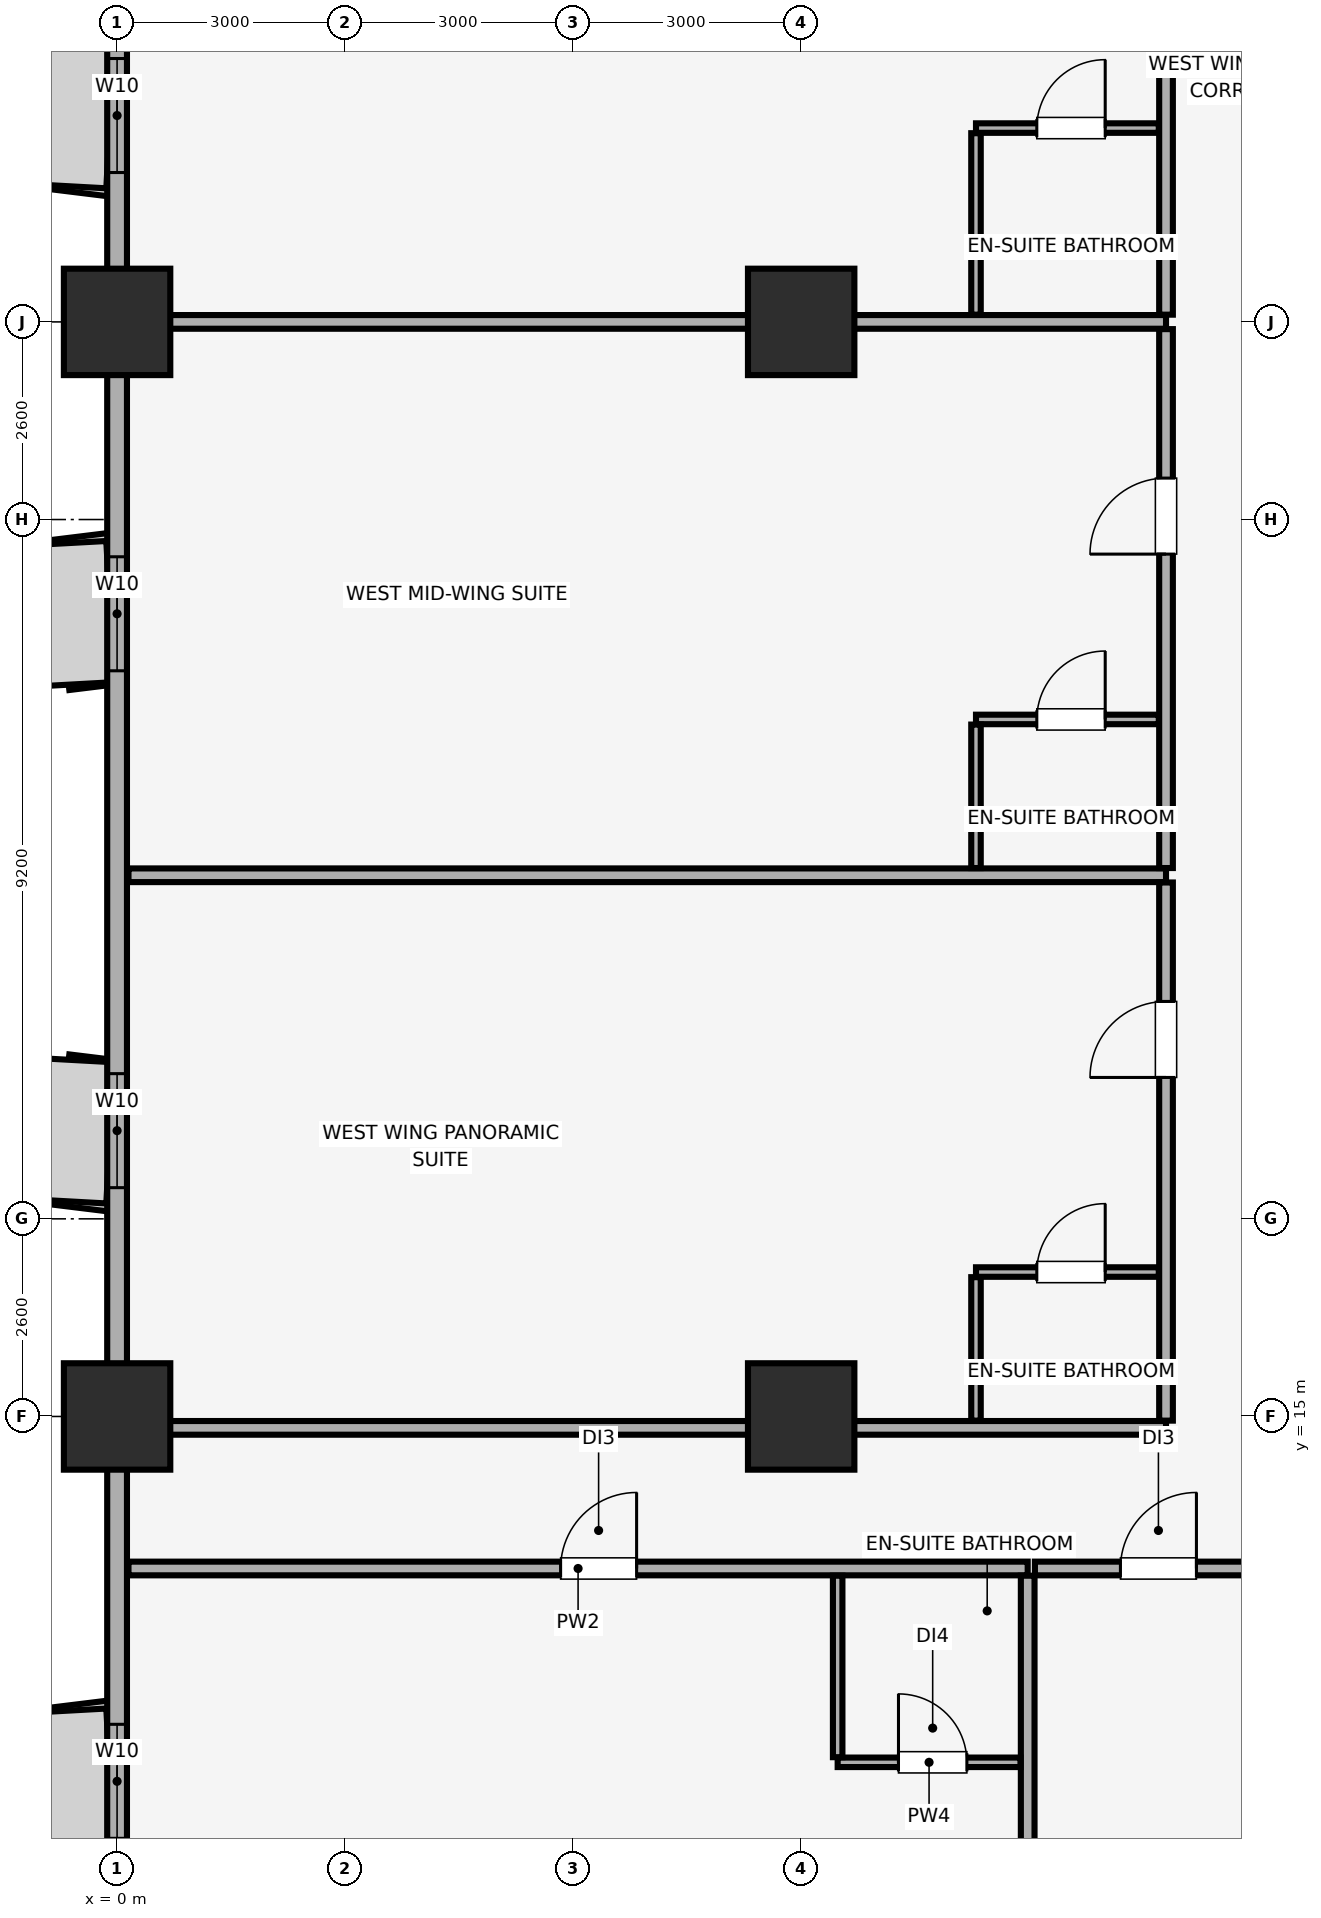
"""IFC4 building model, lengths in metres.
Left out: names, types, materials, properties, quantities, classifications, styles, units other than length and angle.
Written with IfcOpenShell. Run it as: python <this file> out.ifc"""

import sys

from ifc_helpers import new_model, si_unit, direction, frame, frame_2d, origin, origin_2d, place, context, subcontext, project, spatial, rectangle, extrude, element, fill, save


model = new_model("IFC4")
c1 = context("Model", 3, precision=1e-05, world=origin(), true_north=direction((0.0, 1.0)))
c2 = subcontext(c1, "Body", "Model", "MODEL_VIEW")
j1 = project(units=[si_unit("LENGTHUNIT", "METRE"), si_unit("PLANEANGLEUNIT", "RADIAN")], contexts=[c1])
p1 = place(None, origin())
s1 = spatial("IfcSite", under=j1, at=p1, CompositionType="ELEMENT")
p2 = place(p1, origin())
s2 = spatial("IfcBuilding", under=s1, at=p2, CompositionType="ELEMENT")
p3 = place(p2, frame((0.0, 0.0, 68.9)))
s3 = spatial("IfcBuildingStorey", under=s2, at=p3, CompositionType="ELEMENT", Elevation=68.9)
for number, where, z_axis, x_axis in (
    (1, (0.0, 15.0, 0.0), (0.0, 0.0, 1.0), (1.0, 0.0, 0.0)),
    (2, (0.0, 29.4, 0.0), (0.0, 0.0, 1.0), (1.0, 0.0, 0.0)),
    (3, (9.0, 15.0, 0.0), (0.0, 0.0, 1.0), (1.0, 0.0, 0.0)),
    (4, (9.0, 29.4, 0.0), (0.0, 0.0, 1.0), (1.0, 0.0, 0.0)),
):
    element("IfcColumn", number, at=place(p3, frame(where, z_axis=z_axis, x_axis=x_axis)), inside=s3, PredefinedType="COLUMN", context=c2, shape_type="SweptSolid", body=[
        extrude(rectangle(XDim=1.4, YDim=1.4, at=origin_2d()), origin(), (0.0, 0.0, 1.0), 3.51),
    ])
p4 = place(p3, frame((0.0, 44.8, 0.0), z_axis=(0.0, 0.0, 1.0), x_axis=(0.0, -1.0, 0.0)))
e5 = element("IfcWall", 5, at=p4, inside=s3, PredefinedType="SOLIDWALL", context=c2, shape_type="SweptSolid", body=[
    extrude(rectangle(XDim=40.6, YDim=0.26, at=frame_2d((20.3, 0.0))), origin(), (0.0, 0.0, 1.0), 2.56),
])
p5 = place(p4, frame((33.85, 0.0, 0.85)))
e6 = element("IfcOpeningElement", 6, at=p5, cuts=e5, PredefinedType="OPENING", context=c2, shape_type="SweptSolid", body=[
    extrude(rectangle(XDim=1.5, YDim=1.4, at=frame_2d((0.75, 0.7))), frame((0.0, 0.14, 0.0), z_axis=(0.0, -1.0, 0.0), x_axis=(1.0, 0.0, 0.0)), (0.0, 0.0, 1.0), 0.28),
])
p6 = place(p4, frame((25.29, 0.0, 0.85)))
e7 = element("IfcOpeningElement", 7, at=p6, cuts=e5, PredefinedType="OPENING", context=c2, shape_type="SweptSolid", body=[
    extrude(rectangle(XDim=1.5, YDim=1.4, at=frame_2d((0.75, 0.7))), frame((0.0, 0.14, 0.0), z_axis=(0.0, -1.0, 0.0), x_axis=(1.0, 0.0, 0.0)), (0.0, 0.0, 1.0), 0.28),
])
p7 = place(p4, frame((18.49, 0.0, 0.85)))
e8 = element("IfcOpeningElement", 8, at=p7, cuts=e5, PredefinedType="OPENING", context=c2, shape_type="SweptSolid", body=[
    extrude(rectangle(XDim=1.5, YDim=1.4, at=frame_2d((0.75, 0.7))), frame((0.0, 0.14, 0.0), z_axis=(0.0, -1.0, 0.0), x_axis=(1.0, 0.0, 0.0)), (0.0, 0.0, 1.0), 0.28),
])
p8 = place(p4, frame((11.935, 0.0, 0.85)))
e9 = element("IfcOpeningElement", 9, at=p8, cuts=e5, PredefinedType="OPENING", context=c2, shape_type="SweptSolid", body=[
    extrude(rectangle(XDim=1.5, YDim=1.4, at=frame_2d((0.75, 0.7))), frame((0.0, 0.14, 0.0), z_axis=(0.0, -1.0, 0.0), x_axis=(1.0, 0.0, 0.0)), (0.0, 0.0, 1.0), 0.28),
])
p9 = place(p4, frame((7.165, 0.0, 0.85)))
e10 = element("IfcOpeningElement", 10, at=p9, cuts=e5, PredefinedType="OPENING", context=c2, shape_type="SweptSolid", body=[
    extrude(rectangle(XDim=1.5, YDim=1.4, at=frame_2d((0.75, 0.7))), frame((0.0, 0.14, 0.0), z_axis=(0.0, -1.0, 0.0), x_axis=(1.0, 0.0, 0.0)), (0.0, 0.0, 1.0), 0.28),
])
p10 = place(p4, frame((1.685, 0.0, 0.85)))
e11 = element("IfcOpeningElement", 11, at=p10, cuts=e5, PredefinedType="OPENING", context=c2, shape_type="SweptSolid", body=[
    extrude(rectangle(XDim=1.5, YDim=1.4, at=frame_2d((0.75, 0.7))), frame((0.0, 0.14, 0.0), z_axis=(0.0, -1.0, 0.0), x_axis=(1.0, 0.0, 0.0)), (0.0, 0.0, 1.0), 0.28),
])
p11 = place(p3, frame((0.15, 13.0, 0.0), z_axis=(0.0, 0.0, 1.0), x_axis=(1.0, 0.0, 0.0)))
e12 = element("IfcWall", 12, at=p11, inside=s3, PredefinedType="PARTITIONING", context=c2, shape_type="SweptSolid", body=[
    extrude(rectangle(XDim=11.83, YDim=0.18, at=frame_2d((5.915, 0.0))), origin(), (0.0, 0.0, 1.0), 3.51),
])
p12 = place(p11, frame((5.685, 0.0, 0.0)))
e13 = element("IfcOpeningElement", 13, at=p12, cuts=e12, PredefinedType="OPENING", context=c2, shape_type="SweptSolid", body=[
    extrude(rectangle(XDim=1.0, YDim=2.15, at=frame_2d((0.5, 1.075))), frame((0.0, 0.1, 0.0), z_axis=(0.0, -1.0, 0.0), x_axis=(1.0, 0.0, 0.0)), (0.0, 0.0, 1.0), 0.2),
])
p13 = place(p3, frame((11.98, 0.15, 0.0), z_axis=(0.0, 0.0, 1.0), x_axis=(0.0, 1.0, 0.0)))
e14 = element("IfcWall", 14, at=p13, inside=s3, PredefinedType="PARTITIONING", context=c2, shape_type="SweptSolid", body=[
    extrude(rectangle(XDim=12.755, YDim=0.18, at=frame_2d((6.377, 0.0))), origin(), (0.0, 0.0, 1.0), 3.51),
])
p14 = place(p3, frame((9.48, 10.45, 0.0), z_axis=(0.0, 0.0, 1.0), x_axis=(1.0, 0.0, 0.0)))
e15 = element("IfcWall", 15, at=p14, inside=s3, PredefinedType="PARTITIONING", context=c2, shape_type="SweptSolid", body=[
    extrude(rectangle(XDim=2.405, YDim=0.125, at=frame_2d((1.203, 0.0))), origin(), (0.0, 0.0, 1.0), 3.51),
])
p15 = place(p14, frame((0.8, 0.0, 0.0)))
e16 = element("IfcOpeningElement", 16, at=p15, cuts=e15, PredefinedType="OPENING", context=c2, shape_type="SweptSolid", body=[
    extrude(rectangle(XDim=0.9, YDim=2.1, at=frame_2d((0.45, 1.05))), frame((0.0, 0.073, 0.0), z_axis=(0.0, -1.0, 0.0), x_axis=(1.0, 0.0, 0.0)), (0.0, 0.0, 1.0), 0.145),
])
p16 = place(p3, frame((9.48, 10.518, 0.0), z_axis=(0.0, 0.0, 1.0), x_axis=(0.0, 1.0, 0.0)))
e17 = element("IfcWall", 17, at=p16, inside=s3, PredefinedType="PARTITIONING", context=c2, shape_type="SweptSolid", body=[
    extrude(rectangle(XDim=2.387, YDim=0.125, at=frame_2d((1.194, 0.0))), origin(), (0.0, 0.0, 1.0), 3.51),
])
p17 = place(p3, frame((12.075, 13.0, 0.0), z_axis=(0.0, 0.0, 1.0), x_axis=(1.0, 0.0, 0.0)))
e18 = element("IfcWall", 18, at=p17, inside=s3, PredefinedType="PARTITIONING", context=c2, shape_type="SweptSolid", body=[
    extrude(rectangle(XDim=7.435, YDim=0.18, at=frame_2d((3.718, 0.0))), origin(), (0.0, 0.0, 1.0), 3.51),
])
p18 = place(p17, frame((1.125, 0.0, 0.0)))
e19 = element("IfcOpeningElement", 19, at=p18, cuts=e18, PredefinedType="OPENING", context=c2, shape_type="SweptSolid", body=[
    extrude(rectangle(XDim=1.0, YDim=2.15, at=frame_2d((0.5, 1.075))), frame((0.0, 0.1, 0.0), z_axis=(0.0, -1.0, 0.0), x_axis=(1.0, 0.0, 0.0)), (0.0, 0.0, 1.0), 0.2),
])
p19 = place(p3, frame((0.15, 14.85, 0.0), z_axis=(0.0, 0.0, 1.0), x_axis=(1.0, 0.0, 0.0)))
e20 = element("IfcWall", 20, at=p19, inside=s3, PredefinedType="PARTITIONING", context=c2, shape_type="SweptSolid", body=[
    extrude(rectangle(XDim=13.65, YDim=0.18, at=frame_2d((6.825, 0.0))), origin(), (0.0, 0.0, 1.0), 2.86),
])
p20 = place(p3, frame((0.15, 22.12, 0.0), z_axis=(0.0, 0.0, 1.0), x_axis=(1.0, 0.0, 0.0)))
e21 = element("IfcWall", 21, at=p20, inside=s3, PredefinedType="PARTITIONING", context=c2, shape_type="SweptSolid", body=[
    extrude(rectangle(XDim=13.65, YDim=0.18, at=frame_2d((6.825, 0.0))), origin(), (0.0, 0.0, 1.0), 3.51),
])
p21 = place(p3, frame((13.8, 14.945, 0.0), z_axis=(0.0, 0.0, 1.0), x_axis=(0.0, 1.0, 0.0)))
e22 = element("IfcWall", 22, at=p21, inside=s3, PredefinedType="PARTITIONING", context=c2, shape_type="SweptSolid", body=[
    extrude(rectangle(XDim=7.08, YDim=0.18, at=frame_2d((3.54, 0.0))), origin(), (0.0, 0.0, 1.0), 3.51),
])
p22 = place(p21, frame((4.515, 0.0, 0.0)))
e23 = element("IfcOpeningElement", 23, at=p22, cuts=e22, PredefinedType="OPENING", context=c2, shape_type="SweptSolid", body=[
    extrude(rectangle(XDim=1.0, YDim=2.15, at=frame_2d((0.5, 1.075))), frame((0.0, 0.1, 0.0), z_axis=(0.0, -1.0, 0.0), x_axis=(1.0, 0.0, 0.0)), (0.0, 0.0, 1.0), 0.2),
])
p23 = place(p3, frame((11.3, 16.9, 0.0), z_axis=(0.0, 0.0, 1.0), x_axis=(1.0, 0.0, 0.0)))
e24 = element("IfcWall", 24, at=p23, inside=s3, PredefinedType="PARTITIONING", context=c2, shape_type="SweptSolid", body=[
    extrude(rectangle(XDim=2.405, YDim=0.125, at=frame_2d((1.203, 0.0))), origin(), (0.0, 0.0, 1.0), 3.51),
])
p24 = place(p23, frame((0.8, 0.0, 0.0)))
e25 = element("IfcOpeningElement", 25, at=p24, cuts=e24, PredefinedType="OPENING", context=c2, shape_type="SweptSolid", body=[
    extrude(rectangle(XDim=0.9, YDim=2.1, at=frame_2d((0.45, 1.05))), frame((0.0, 0.073, 0.0), z_axis=(0.0, -1.0, 0.0), x_axis=(1.0, 0.0, 0.0)), (0.0, 0.0, 1.0), 0.145),
])
p25 = place(p3, frame((11.3, 14.945, 0.0), z_axis=(0.0, 0.0, 1.0), x_axis=(0.0, 1.0, 0.0)))
e26 = element("IfcWall", 26, at=p25, inside=s3, PredefinedType="PARTITIONING", context=c2, shape_type="SweptSolid", body=[
    extrude(rectangle(XDim=1.887, YDim=0.125, at=frame_2d((0.944, 0.0))), origin(), (0.0, 0.0, 1.0), 3.51),
])
p26 = place(p3, frame((0.15, 29.4, 0.0), z_axis=(0.0, 0.0, 1.0), x_axis=(1.0, 0.0, 0.0)))
e27 = element("IfcWall", 27, at=p26, inside=s3, PredefinedType="PARTITIONING", context=c2, shape_type="SweptSolid", body=[
    extrude(rectangle(XDim=13.65, YDim=0.18, at=frame_2d((6.825, 0.0))), origin(), (0.0, 0.0, 1.0), 2.86),
])
p27 = place(p3, frame((13.8, 22.215, 0.0), z_axis=(0.0, 0.0, 1.0), x_axis=(0.0, 1.0, 0.0)))
e28 = element("IfcWall", 28, at=p27, inside=s3, PredefinedType="PARTITIONING", context=c2, shape_type="SweptSolid", body=[
    extrude(rectangle(XDim=7.09, YDim=0.18, at=frame_2d((3.545, 0.0))), origin(), (0.0, 0.0, 1.0), 3.51),
])
p28 = place(p27, frame((4.13, 0.0, 0.0)))
e29 = element("IfcOpeningElement", 29, at=p28, cuts=e28, PredefinedType="OPENING", context=c2, shape_type="SweptSolid", body=[
    extrude(rectangle(XDim=1.0, YDim=2.15, at=frame_2d((0.5, 1.075))), frame((0.0, 0.1, 0.0), z_axis=(0.0, -1.0, 0.0), x_axis=(1.0, 0.0, 0.0)), (0.0, 0.0, 1.0), 0.2),
])
p29 = place(p3, frame((11.3, 24.17, 0.0), z_axis=(0.0, 0.0, 1.0), x_axis=(1.0, 0.0, 0.0)))
e30 = element("IfcWall", 30, at=p29, inside=s3, PredefinedType="PARTITIONING", context=c2, shape_type="SweptSolid", body=[
    extrude(rectangle(XDim=2.405, YDim=0.125, at=frame_2d((1.203, 0.0))), origin(), (0.0, 0.0, 1.0), 3.51),
])
p30 = place(p29, frame((0.8, 0.0, 0.0)))
e31 = element("IfcOpeningElement", 31, at=p30, cuts=e30, PredefinedType="OPENING", context=c2, shape_type="SweptSolid", body=[
    extrude(rectangle(XDim=0.9, YDim=2.1, at=frame_2d((0.45, 1.05))), frame((0.0, 0.073, 0.0), z_axis=(0.0, -1.0, 0.0), x_axis=(1.0, 0.0, 0.0)), (0.0, 0.0, 1.0), 0.145),
])
p31 = place(p3, frame((11.3, 22.215, 0.0), z_axis=(0.0, 0.0, 1.0), x_axis=(0.0, 1.0, 0.0)))
e32 = element("IfcWall", 32, at=p31, inside=s3, PredefinedType="PARTITIONING", context=c2, shape_type="SweptSolid", body=[
    extrude(rectangle(XDim=1.887, YDim=0.125, at=frame_2d((0.944, 0.0))), origin(), (0.0, 0.0, 1.0), 3.51),
])
p32 = place(p3, frame((13.8, 29.495, 0.0), z_axis=(0.0, 0.0, 1.0), x_axis=(0.0, 1.0, 0.0)))
e33 = element("IfcWall", 33, at=p32, inside=s3, PredefinedType="PARTITIONING", context=c2, shape_type="SweptSolid", body=[
    extrude(rectangle(XDim=10.51, YDim=0.18, at=frame_2d((5.255, 0.0))), origin(), (0.0, 0.0, 1.0), 3.51),
])
p33 = place(p32, frame((5.84, 0.0, 0.0)))
e34 = element("IfcOpeningElement", 34, at=p33, cuts=e33, PredefinedType="OPENING", context=c2, shape_type="SweptSolid", body=[
    extrude(rectangle(XDim=1.0, YDim=2.15, at=frame_2d((0.5, 1.075))), frame((0.0, 0.1, 0.0), z_axis=(0.0, -1.0, 0.0), x_axis=(1.0, 0.0, 0.0)), (0.0, 0.0, 1.0), 0.2),
])
p34 = place(p3, frame((11.3, 31.95, 0.0), z_axis=(0.0, 0.0, 1.0), x_axis=(1.0, 0.0, 0.0)))
e35 = element("IfcWall", 35, at=p34, inside=s3, PredefinedType="PARTITIONING", context=c2, shape_type="SweptSolid", body=[
    extrude(rectangle(XDim=2.405, YDim=0.125, at=frame_2d((1.203, 0.0))), origin(), (0.0, 0.0, 1.0), 3.51),
])
p35 = place(p34, frame((0.8, 0.0, 0.0)))
e36 = element("IfcOpeningElement", 36, at=p35, cuts=e35, PredefinedType="OPENING", context=c2, shape_type="SweptSolid", body=[
    extrude(rectangle(XDim=0.9, YDim=2.1, at=frame_2d((0.45, 1.05))), frame((0.0, 0.073, 0.0), z_axis=(0.0, -1.0, 0.0), x_axis=(1.0, 0.0, 0.0)), (0.0, 0.0, 1.0), 0.145),
])
p36 = place(p3, frame((11.3, 29.495, 0.0), z_axis=(0.0, 0.0, 1.0), x_axis=(0.0, 1.0, 0.0)))
e37 = element("IfcWall", 37, at=p36, inside=s3, PredefinedType="PARTITIONING", context=c2, shape_type="SweptSolid", body=[
    extrude(rectangle(XDim=2.387, YDim=0.125, at=frame_2d((1.194, 0.0))), origin(), (0.0, 0.0, 1.0), 3.51),
])
p37 = place(p5, origin())
e38 = element("IfcWindow", 38, at=p37, inside=s3, PartitioningType="SINGLE_PANEL", PredefinedType="WINDOW", context=c2, shape_type="SweptSolid", body=[
    extrude(rectangle(XDim=1.5, YDim=1.4, at=frame_2d((0.75, 0.7))), frame((0.0, 0.03, 0.0), z_axis=(0.0, -1.0, 0.0), x_axis=(1.0, 0.0, 0.0)), (0.0, 0.0, 1.0), 0.06),
])
fill(e6, e38)
p38 = place(p6, origin())
e39 = element("IfcWindow", 39, at=p38, inside=s3, PartitioningType="SINGLE_PANEL", PredefinedType="WINDOW", context=c2, shape_type="SweptSolid", body=[
    extrude(rectangle(XDim=1.5, YDim=1.4, at=frame_2d((0.75, 0.7))), frame((0.0, 0.03, 0.0), z_axis=(0.0, -1.0, 0.0), x_axis=(1.0, 0.0, 0.0)), (0.0, 0.0, 1.0), 0.06),
])
fill(e7, e39)
p39 = place(p7, origin())
e40 = element("IfcWindow", 40, at=p39, inside=s3, PartitioningType="SINGLE_PANEL", PredefinedType="WINDOW", context=c2, shape_type="SweptSolid", body=[
    extrude(rectangle(XDim=1.5, YDim=1.4, at=frame_2d((0.75, 0.7))), frame((0.0, 0.03, 0.0), z_axis=(0.0, -1.0, 0.0), x_axis=(1.0, 0.0, 0.0)), (0.0, 0.0, 1.0), 0.06),
])
fill(e8, e40)
p40 = place(p8, origin())
e41 = element("IfcWindow", 41, at=p40, inside=s3, PartitioningType="SINGLE_PANEL", PredefinedType="WINDOW", context=c2, shape_type="SweptSolid", body=[
    extrude(rectangle(XDim=1.5, YDim=1.4, at=frame_2d((0.75, 0.7))), frame((0.0, 0.03, 0.0), z_axis=(0.0, -1.0, 0.0), x_axis=(1.0, 0.0, 0.0)), (0.0, 0.0, 1.0), 0.06),
])
fill(e9, e41)
p41 = place(p12, origin())
e42 = element("IfcDoor", 42, at=p41, inside=s3, OperationType="SINGLE_SWING_RIGHT", PredefinedType="DOOR", context=c2, shape_type="SweptSolid", body=[
    extrude(rectangle(XDim=1.0, YDim=2.15, at=frame_2d((0.5, 1.075))), frame((0.0, 0.025, 0.0), z_axis=(0.0, -1.0, 0.0), x_axis=(1.0, 0.0, 0.0)), (0.0, 0.0, 1.0), 0.05),
])
fill(e13, e42)
p42 = place(p15, origin())
e43 = element("IfcDoor", 43, at=p42, inside=s3, OperationType="SINGLE_SWING_LEFT", PredefinedType="DOOR", context=c2, shape_type="SweptSolid", body=[
    extrude(rectangle(XDim=0.9, YDim=2.1, at=frame_2d((0.45, 1.05))), frame((0.0, 0.025, 0.0), z_axis=(0.0, -1.0, 0.0), x_axis=(1.0, 0.0, 0.0)), (0.0, 0.0, 1.0), 0.05),
])
fill(e16, e43)
p43 = place(p18, origin())
e44 = element("IfcDoor", 44, at=p43, inside=s3, OperationType="SINGLE_SWING_RIGHT", PredefinedType="DOOR", context=c2, shape_type="SweptSolid", body=[
    extrude(rectangle(XDim=1.0, YDim=2.15, at=frame_2d((0.5, 1.075))), frame((0.0, 0.025, 0.0), z_axis=(0.0, -1.0, 0.0), x_axis=(1.0, 0.0, 0.0)), (0.0, 0.0, 1.0), 0.05),
])
fill(e19, e44)
p44 = place(p22, origin())
e45 = element("IfcDoor", 45, at=p44, inside=s3, OperationType="SINGLE_SWING_LEFT", PredefinedType="DOOR", context=c2, shape_type="SweptSolid", body=[
    extrude(rectangle(XDim=1.0, YDim=2.15, at=frame_2d((0.5, 1.075))), frame((0.0, 0.025, 0.0), z_axis=(0.0, -1.0, 0.0), x_axis=(1.0, 0.0, 0.0)), (0.0, 0.0, 1.0), 0.05),
])
fill(e23, e45)
p45 = place(p24, origin())
e46 = element("IfcDoor", 46, at=p45, inside=s3, OperationType="SINGLE_SWING_RIGHT", PredefinedType="DOOR", context=c2, shape_type="SweptSolid", body=[
    extrude(rectangle(XDim=0.9, YDim=2.1, at=frame_2d((0.45, 1.05))), frame((0.0, 0.025, 0.0), z_axis=(0.0, -1.0, 0.0), x_axis=(1.0, 0.0, 0.0)), (0.0, 0.0, 1.0), 0.05),
])
fill(e25, e46)
p46 = place(p28, origin())
e47 = element("IfcDoor", 47, at=p46, inside=s3, OperationType="SINGLE_SWING_LEFT", PredefinedType="DOOR", context=c2, shape_type="SweptSolid", body=[
    extrude(rectangle(XDim=1.0, YDim=2.15, at=frame_2d((0.5, 1.075))), frame((0.0, 0.025, 0.0), z_axis=(0.0, -1.0, 0.0), x_axis=(1.0, 0.0, 0.0)), (0.0, 0.0, 1.0), 0.05),
])
fill(e29, e47)
p47 = place(p30, origin())
e48 = element("IfcDoor", 48, at=p47, inside=s3, OperationType="SINGLE_SWING_RIGHT", PredefinedType="DOOR", context=c2, shape_type="SweptSolid", body=[
    extrude(rectangle(XDim=0.9, YDim=2.1, at=frame_2d((0.45, 1.05))), frame((0.0, 0.025, 0.0), z_axis=(0.0, -1.0, 0.0), x_axis=(1.0, 0.0, 0.0)), (0.0, 0.0, 1.0), 0.05),
])
fill(e31, e48)
p48 = place(p35, origin())
e49 = element("IfcDoor", 49, at=p48, inside=s3, OperationType="SINGLE_SWING_RIGHT", PredefinedType="DOOR", context=c2, shape_type="SweptSolid", body=[
    extrude(rectangle(XDim=0.9, YDim=2.1, at=frame_2d((0.45, 1.05))), frame((0.0, 0.025, 0.0), z_axis=(0.0, -1.0, 0.0), x_axis=(1.0, 0.0, 0.0)), (0.0, 0.0, 1.0), 0.05),
])
fill(e36, e49)
save(model, sys.argv[1])
